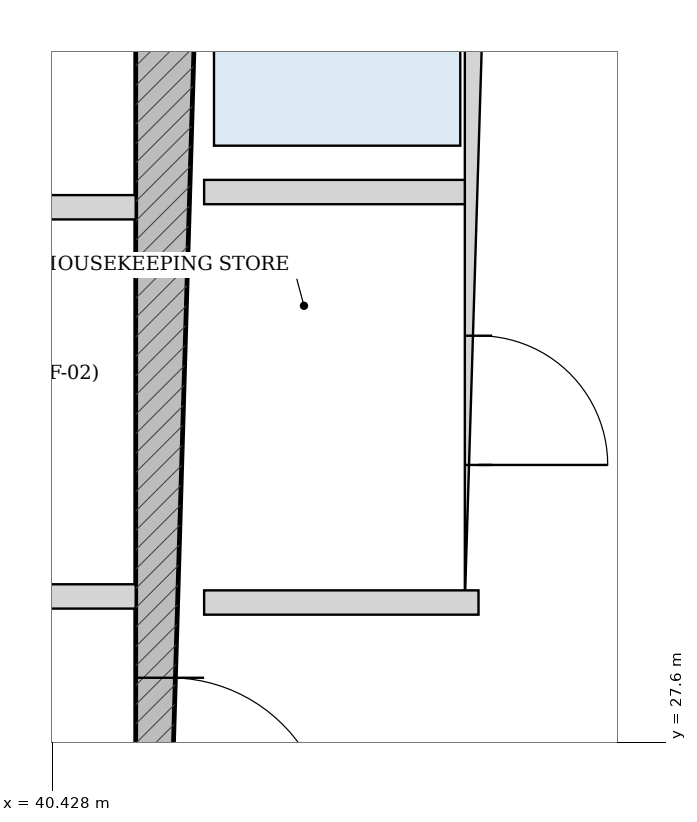
"""IFC4 building model, lengths in metres.
Left out: names, types, materials, properties, quantities, classifications, styles, units other than length and angle.
Written with IfcOpenShell. Run it as: python <this file> out.ifc"""

import sys

from ifc_helpers import new_model, si_unit, direction, frame, frame_2d, origin, place, context, subcontext, project, spatial, rectangle, extrude, source, transform, mapped, element, fill, save


model = new_model("IFC4")
c1 = context("Model", 3, precision=1e-05, world=origin(), true_north=direction((-0.2419218956, 0.970295726276)))
c2 = subcontext(c1, "Body", "Model", "MODEL_VIEW")
j1 = project(units=[si_unit("LENGTHUNIT", "METRE"), si_unit("PLANEANGLEUNIT", "RADIAN")], contexts=[c1])
p1 = place(None, origin())
s1 = spatial("IfcSite", under=j1, at=p1, CompositionType="ELEMENT")
p2 = place(p1, origin())
s2 = spatial("IfcBuilding", under=s1, at=p2, CompositionType="ELEMENT")
p3 = place(p2, frame((0.0, 0.0, 90.6)))
s3 = spatial("IfcBuildingStorey", under=s2, at=p3, CompositionType="ELEMENT", Elevation=90.6)
p4 = place(p3, frame((41.2, 19.175, 0.0), z_axis=(0.0, 0.0, 1.0), x_axis=(0.0, 1.0, 0.0)))
e1 = element("IfcWall", 1, at=p4, inside=s3, PredefinedType="SHEAR", context=c2, shape_type="SweptSolid", body=[
    extrude(rectangle(XDim=15.25, YDim=0.45, at=frame_2d((7.625, 0.0))), origin(), (0.0, 0.0, 1.0), 3.325),
])
p5 = place(p4, frame((7.8, 0.0, 0.0)))
e2 = element("IfcOpeningElement", 2, at=p5, cuts=e1, PredefinedType="OPENING", context=c2, shape_type="SweptSolid", body=[
    extrude(rectangle(XDim=1.05, YDim=2.15, at=frame_2d((0.525, 1.075))), frame((0.0, 0.235, 0.0), z_axis=(0.0, -1.0, 0.0), x_axis=(1.0, 0.0, 0.0)), (0.0, 0.0, 1.0), 0.47),
])
p6 = place(p3, frame((43.23, 28.52, 0.0), z_axis=(0.0, 0.0, 1.0), x_axis=(0.0, 1.0, 0.0)))
e3 = element("IfcWall", 3, at=p6, inside=s3, PredefinedType="PARTITIONING", context=c2, shape_type="SweptSolid", body=[
    extrude(rectangle(XDim=5.905, YDim=0.18, at=frame_2d((2.953, 0.0))), origin(), (0.0, 0.0, 1.0), 3.325),
])
p7 = place(p6, frame((0.905, 0.0, 0.0)))
e4 = element("IfcOpeningElement", 4, at=p7, cuts=e3, PredefinedType="OPENING", context=c2, shape_type="SweptSolid", body=[
    extrude(rectangle(XDim=0.85, YDim=2.1, at=frame_2d((0.425, 1.05))), frame((0.0, 0.1, 0.0), z_axis=(0.0, -1.0, 0.0), x_axis=(1.0, 0.0, 0.0)), (0.0, 0.0, 1.0), 0.2),
])
p8 = place(p6, frame((3.655, 0.0, 0.0)))
e5 = element("IfcOpeningElement", 5, at=p8, cuts=e3, PredefinedType="OPENING", context=c2, shape_type="SweptSolid", body=[
    extrude(rectangle(XDim=1.15, YDim=2.2, at=frame_2d((0.575, 1.1))), frame((0.0, 0.1, 0.0), z_axis=(0.0, -1.0, 0.0), x_axis=(1.0, 0.0, 0.0)), (0.0, 0.0, 1.0), 0.2),
])
p9 = place(p3, frame((41.425, 31.22, 0.0), z_axis=(0.0, 0.0, 1.0), x_axis=(1.0, 0.0, 0.0)))
e6 = element("IfcWall", 6, at=p9, inside=s3, PredefinedType="PARTITIONING", context=c2, shape_type="SweptSolid", body=[
    extrude(rectangle(XDim=1.715, YDim=0.16, at=frame_2d((0.857, 0.0))), origin(), (0.0, 0.0, 1.0), 3.325),
])
p10 = place(p3, frame((41.425, 28.52, 0.0), z_axis=(0.0, 0.0, 1.0), x_axis=(1.0, 0.0, 0.0)))
e7 = element("IfcWall", 7, at=p10, inside=s3, PredefinedType="PARTITIONING", context=c2, shape_type="SweptSolid", body=[
    extrude(rectangle(XDim=1.805, YDim=0.16, at=frame_2d((0.902, 0.0))), origin(), (0.0, 0.0, 1.0), 3.325),
])
p11 = place(p3, frame((35.025, 28.56, 0.0), z_axis=(0.0, 0.0, 1.0), x_axis=(1.0, 0.0, 0.0)))
e8 = element("IfcWall", 8, at=p11, inside=s3, PredefinedType="PARTITIONING", context=c2, shape_type="SweptSolid", body=[
    extrude(rectangle(XDim=5.95, YDim=0.16, at=frame_2d((2.975, 0.0))), origin(), (0.0, 0.0, 1.0), 3.325),
])
p12 = place(p11, frame((0.76, 0.0, 0.0)))
e9 = element("IfcOpeningElement", 9, at=p12, cuts=e8, PredefinedType="OPENING", context=c2, shape_type="SweptSolid", body=[
    extrude(rectangle(XDim=1.1, YDim=2.2, at=frame_2d((0.55, 1.1))), frame((0.0, 0.09, 0.0), z_axis=(0.0, -1.0, 0.0), x_axis=(1.0, 0.0, 0.0)), (0.0, 0.0, 1.0), 0.18),
])
p13 = place(p11, frame((2.425, 0.0, 0.0)))
e10 = element("IfcOpeningElement", 10, at=p13, cuts=e8, PredefinedType="OPENING", context=c2, shape_type="SweptSolid", body=[
    extrude(rectangle(XDim=1.1, YDim=2.2, at=frame_2d((0.55, 1.1))), frame((0.0, 0.09, 0.0), z_axis=(0.0, -1.0, 0.0), x_axis=(1.0, 0.0, 0.0)), (0.0, 0.0, 1.0), 0.18),
])
p14 = place(p11, frame((4.09, 0.0, 0.0)))
e11 = element("IfcOpeningElement", 11, at=p14, cuts=e8, PredefinedType="OPENING", context=c2, shape_type="SweptSolid", body=[
    extrude(rectangle(XDim=1.1, YDim=2.2, at=frame_2d((0.55, 1.1))), frame((0.0, 0.09, 0.0), z_axis=(0.0, -1.0, 0.0), x_axis=(1.0, 0.0, 0.0)), (0.0, 0.0, 1.0), 0.18),
])
p15 = place(p3, frame((35.025, 31.12, 0.0), z_axis=(0.0, 0.0, 1.0), x_axis=(1.0, 0.0, 0.0)))
e12 = element("IfcWall", 12, at=p15, inside=s3, PredefinedType="PARTITIONING", context=c2, shape_type="SweptSolid", body=[
    extrude(rectangle(XDim=5.95, YDim=0.16, at=frame_2d((2.975, 0.0))), origin(), (0.0, 0.0, 1.0), 3.325),
])
m1 = source(origin(), c2, "Body", "SweptSolid", [
    extrude(rectangle(XDim=1.05, YDim=2.15, at=frame_2d((0.525, 1.075))), frame((0.0, 0.025, 0.0), z_axis=(0.0, -1.0, 0.0), x_axis=(1.0, 0.0, 0.0)), (0.0, 0.0, 1.0), 0.05),
])
p16 = place(p5, frame((1.05, 0.0, 0.0), z_axis=(0.0, 0.0, 1.0), x_axis=(-1.0, 0.0, 0.0)))
e13 = element("IfcDoor", 13, at=p16, inside=s3, OperationType="SINGLE_SWING_RIGHT", PredefinedType="DOOR", context=c2, shape_type="MappedRepresentation", body=[
    mapped(m1, transform((0.0, 0.0, 0.0), scale=1.0)),
])
fill(e2, e13)
m2 = source(origin(), c2, "Body", "SweptSolid", [
    extrude(rectangle(XDim=0.85, YDim=2.1, at=frame_2d((0.425, 1.05))), frame((0.0, 0.025, 0.0), z_axis=(0.0, -1.0, 0.0), x_axis=(1.0, 0.0, 0.0)), (0.0, 0.0, 1.0), 0.05),
])
p17 = place(p7, frame((0.85, 0.0, 0.0), z_axis=(0.0, 0.0, 1.0), x_axis=(-1.0, 0.0, 0.0)))
e14 = element("IfcDoor", 14, at=p17, inside=s3, OperationType="SINGLE_SWING_RIGHT", PredefinedType="DOOR", context=c2, shape_type="MappedRepresentation", body=[
    mapped(m2, transform((0.0, 0.0, 0.0), scale=1.0)),
])
fill(e4, e14)
save(model, sys.argv[1])
